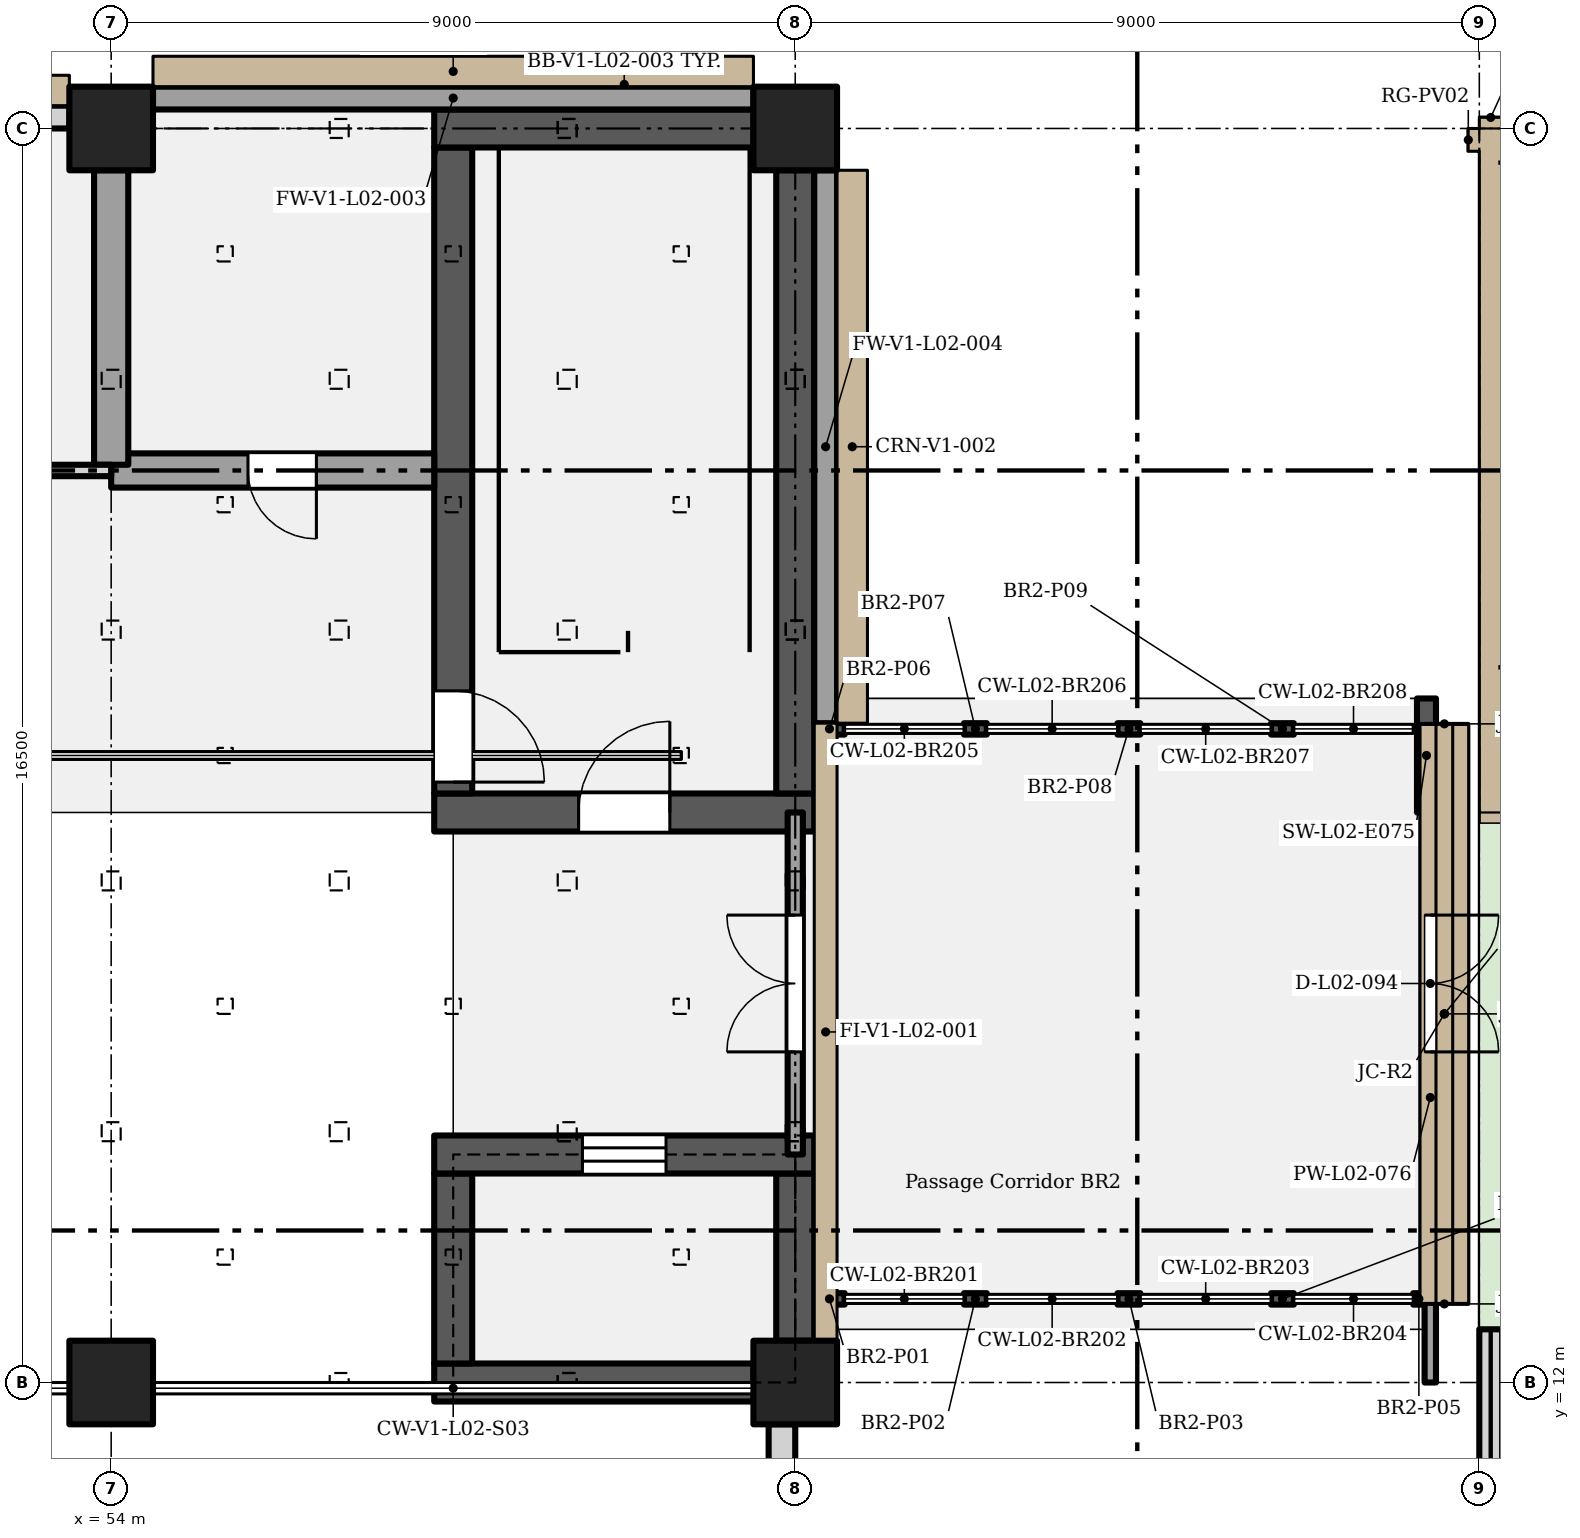
"""IFC4 building model, lengths in metres.
Left out: names, types, materials, properties, quantities, classifications, styles, units other than length and angle.
Written with IfcOpenShell. Run it as: python <this file> out.ifc"""

import sys

from ifc_helpers import new_model, si_unit, direction, frame, frame_2d, origin, origin_2d, place, context, subcontext, project, spatial, rectangle, extrude, element, fill, save


model = new_model("IFC4")
c1 = context("Model", 3, precision=1e-05, world=origin(), true_north=direction((0.0, 1.0)))
c2 = subcontext(c1, "Body", "Model", "MODEL_VIEW")
j1 = project(units=[si_unit("LENGTHUNIT", "METRE"), si_unit("PLANEANGLEUNIT", "RADIAN")], contexts=[c1])
p1 = place(None, origin())
s1 = spatial("IfcSite", under=j1, at=p1, CompositionType="ELEMENT")
p2 = place(p1, origin())
s2 = spatial("IfcBuilding", under=s1, at=p2, CompositionType="ELEMENT")
p3 = place(p2, frame((0.0, 0.0, 12.0)))
s3 = spatial("IfcBuildingStorey", under=s2, at=p3, CompositionType="ELEMENT", Elevation=12.0)
for number, where, z_axis, x_axis in (
    (1, (54.0, 12.0, 0.0), (0.0, 0.0, 1.0), (1.0, 0.0, 0.0)),
    (2, (63.0, 12.0, 0.0), (0.0, 0.0, 1.0), (1.0, 0.0, 0.0)),
    (3, (54.0, 28.5, 0.0), (0.0, 0.0, 1.0), (1.0, 0.0, 0.0)),
    (4, (63.0, 28.5, 0.0), (0.0, 0.0, 1.0), (1.0, 0.0, 0.0)),
):
    element("IfcColumn", number, at=place(p3, frame(where, z_axis=z_axis, x_axis=x_axis)), inside=s3, PredefinedType="COLUMN", context=c2, shape_type="SweptSolid", body=[
        extrude(rectangle(XDim=1.1, YDim=1.1, at=origin_2d()), origin(), (0.0, 0.0, 1.0), 5.4),
    ])
p4 = place(p3, frame((58.25, 12.0, 0.0), z_axis=(0.0, 0.0, 1.0), x_axis=(1.0, 0.0, 0.0)))
e5 = element("IfcWall", 5, at=p4, inside=s3, PredefinedType="SHEAR", context=c2, shape_type="SweptSolid", body=[
    extrude(rectangle(XDim=4.2, YDim=0.5, at=frame_2d((2.1, 0.0))), origin(), (0.0, 0.0, 1.0), 5.4),
])
p5 = place(p3, frame((58.5, 12.25, 0.0), z_axis=(0.0, 0.0, 1.0), x_axis=(0.0, 1.0, 0.0)))
e6 = element("IfcWall", 6, at=p5, inside=s3, PredefinedType="SHEAR", context=c2, shape_type="SweptSolid", body=[
    extrude(rectangle(XDim=2.5, YDim=0.5, at=frame_2d((1.25, 0.0))), origin(), (0.0, 0.0, 1.0), 5.4),
])
p6 = place(p3, frame((63.0, 12.55, 0.0), z_axis=(0.0, 0.0, 1.0), x_axis=(0.0, 1.0, 0.0)))
e7 = element("IfcWall", 7, at=p6, inside=s3, PredefinedType="SHEAR", context=c2, shape_type="SweptSolid", body=[
    extrude(rectangle(XDim=2.2, YDim=0.5, at=frame_2d((1.1, 0.0))), origin(), (0.0, 0.0, 1.0), 5.4),
])
p7 = place(p3, frame((58.25, 15.0, 0.0), z_axis=(0.0, 0.0, 1.0), x_axis=(1.0, 0.0, 0.0)))
e8 = element("IfcWall", 8, at=p7, inside=s3, PredefinedType="SHEAR", context=c2, shape_type="SweptSolid", body=[
    extrude(rectangle(XDim=5.0, YDim=0.5, at=frame_2d((2.5, 0.0))), origin(), (0.0, 0.0, 1.0), 5.4),
])
p8 = place(p7, frame((1.95, 0.0, 0.0)))
e9 = element("IfcOpeningElement", 9, at=p8, cuts=e8, PredefinedType="OPENING", context=c2, shape_type="SweptSolid", body=[
    extrude(rectangle(XDim=1.1, YDim=2.1, at=frame_2d((0.55, 1.05))), frame((0.0, 0.26, 0.0), z_axis=(0.0, -1.0, 0.0), x_axis=(1.0, 0.0, 0.0)), (0.0, 0.0, 1.0), 0.52),
])
p9 = place(p3, frame((58.25, 19.5, 0.0), z_axis=(0.0, 0.0, 1.0), x_axis=(1.0, 0.0, 0.0)))
e10 = element("IfcWall", 10, at=p9, inside=s3, PredefinedType="SHEAR", context=c2, shape_type="SweptSolid", body=[
    extrude(rectangle(XDim=5.0, YDim=0.5, at=frame_2d((2.5, 0.0))), origin(), (0.0, 0.0, 1.0), 5.4),
])
p10 = place(p9, frame((1.9, 0.0, 0.0)))
e11 = element("IfcOpeningElement", 11, at=p10, cuts=e10, PredefinedType="OPENING", context=c2, shape_type="SweptSolid", body=[
    extrude(rectangle(XDim=1.2, YDim=2.1, at=frame_2d((0.6, 1.05))), frame((0.0, 0.26, 0.0), z_axis=(0.0, -1.0, 0.0), x_axis=(1.0, 0.0, 0.0)), (0.0, 0.0, 1.0), 0.52),
])
p11 = place(p3, frame((58.5, 19.75, 0.0), z_axis=(0.0, 0.0, 1.0), x_axis=(0.0, 1.0, 0.0)))
e12 = element("IfcWall", 12, at=p11, inside=s3, PredefinedType="SHEAR", context=c2, shape_type="SweptSolid", body=[
    extrude(rectangle(XDim=8.5, YDim=0.5, at=frame_2d((4.25, 0.0))), origin(), (0.0, 0.0, 1.0), 5.4),
])
p12 = place(p11, frame((1.35, 0.0, 0.0), z_axis=(0.0, 0.0, 1.0), x_axis=(-1.0, 0.0, 0.0)))
e13 = element("IfcOpeningElement", 13, at=p12, cuts=e12, PredefinedType="OPENING", context=c2, shape_type="SweptSolid", body=[
    extrude(rectangle(XDim=1.2, YDim=2.1, at=frame_2d((0.6, 1.05))), frame((0.0, 0.26, 0.0), z_axis=(0.0, -1.0, 0.0), x_axis=(1.0, 0.0, 0.0)), (0.0, 0.0, 1.0), 0.52),
])
p13 = place(p3, frame((63.0, 19.75, 0.0), z_axis=(0.0, 0.0, 1.0), x_axis=(0.0, 1.0, 0.0)))
e14 = element("IfcWall", 14, at=p13, inside=s3, PredefinedType="SHEAR", context=c2, shape_type="SweptSolid", body=[
    extrude(rectangle(XDim=8.2, YDim=0.5, at=frame_2d((4.1, 0.0))), origin(), (0.0, 0.0, 1.0), 5.4),
])
p14 = place(p3, frame((58.25, 28.5, 0.0), z_axis=(0.0, 0.0, 1.0), x_axis=(1.0, 0.0, 0.0)))
e15 = element("IfcWall", 15, at=p14, inside=s3, PredefinedType="SHEAR", context=c2, shape_type="SweptSolid", body=[
    extrude(rectangle(XDim=4.2, YDim=0.5, at=frame_2d((2.1, 0.0))), origin(), (0.0, 0.0, 1.0), 5.4),
])
p15 = place(p3, frame((45.55, 28.65, 0.0), z_axis=(0.0, 0.0, 1.0), x_axis=(1.0, 0.0, 0.0)))
e16 = element("IfcWall", 16, at=p15, inside=s3, PredefinedType="SOLIDWALL", context=c2, shape_type="SweptSolid", body=[
    extrude(rectangle(XDim=7.9, YDim=0.3, at=frame_2d((3.95, 0.0))), origin(), (0.0, 0.0, 1.0), 5.4),
])
p16 = place(p15, frame((0.425, 0.0, 1.05)))
e17 = element("IfcOpeningElement", 17, at=p16, cuts=e16, PredefinedType="OPENING", context=c2, shape_type="SweptSolid", body=[
    extrude(rectangle(XDim=1.05, YDim=2.4, at=frame_2d((0.525, 1.2))), frame((0.0, 0.16, 0.0), z_axis=(0.0, -1.0, 0.0), x_axis=(1.0, 0.0, 0.0)), (0.0, 0.0, 1.0), 0.32),
])
p17 = place(p15, frame((3.425, 0.0, 1.05)))
e18 = element("IfcOpeningElement", 18, at=p17, cuts=e16, PredefinedType="OPENING", context=c2, shape_type="SweptSolid", body=[
    extrude(rectangle(XDim=1.05, YDim=2.4, at=frame_2d((0.525, 1.2))), frame((0.0, 0.16, 0.0), z_axis=(0.0, -1.0, 0.0), x_axis=(1.0, 0.0, 0.0)), (0.0, 0.0, 1.0), 0.32),
])
p18 = place(p15, frame((6.425, 0.0, 1.05)))
e19 = element("IfcOpeningElement", 19, at=p18, cuts=e16, PredefinedType="OPENING", context=c2, shape_type="SweptSolid", body=[
    extrude(rectangle(XDim=1.05, YDim=2.4, at=frame_2d((0.525, 1.2))), frame((0.0, 0.16, 0.0), z_axis=(0.0, -1.0, 0.0), x_axis=(1.0, 0.0, 0.0)), (0.0, 0.0, 1.0), 0.32),
])
p19 = place(p3, frame((54.55, 28.9, 0.0), z_axis=(0.0, 0.0, 1.0), x_axis=(1.0, 0.0, 0.0)))
e20 = element("IfcWall", 20, at=p19, inside=s3, PredefinedType="SOLIDWALL", context=c2, shape_type="SweptSolid", body=[
    extrude(rectangle(XDim=7.9, YDim=0.3, at=frame_2d((3.95, 0.0))), origin(), (0.0, 0.0, 1.0), 5.4),
])
p20 = place(p3, frame((63.4, 20.675, 0.0), z_axis=(0.0, 0.0, 1.0), x_axis=(0.0, 1.0, 0.0)))
e21 = element("IfcWall", 21, at=p20, inside=s3, PredefinedType="SOLIDWALL", context=c2, shape_type="SweptSolid", body=[
    extrude(rectangle(XDim=7.275, YDim=0.3, at=frame_2d((3.637, 0.0))), origin(), (0.0, 0.0, 1.0), 5.4),
])
p21 = place(p3, frame((62.825, 0.7, 0.0), z_axis=(0.0, 0.0, 1.0), x_axis=(0.0, 1.0, 0.0)))
e22 = element("IfcWall", 22, at=p21, inside=s3, PredefinedType="SOLIDWALL", context=c2, shape_type="SweptSolid", body=[
    extrude(rectangle(XDim=10.75, YDim=0.35, at=frame_2d((5.375, 0.0))), origin(), (0.0, 0.0, 1.0), 5.4),
])
p22 = place(p2, frame((0.0, 0.0, 6.6)))
s4 = spatial("IfcBuildingStorey", under=s2, at=p22, CompositionType="ELEMENT", Elevation=6.6)
p23 = place(p22, frame((71.43, 19.5, 5.202), z_axis=(0.0, 0.0, 1.0), x_axis=(1.0, 0.0, 0.0)))
e23 = element("IfcWall", 23, at=p23, inside=s4, PredefinedType="SOLIDWALL", context=c2, shape_type="SweptSolid", body=[
    extrude(rectangle(XDim=5.21, YDim=0.28, at=frame_2d((2.605, 0.0))), origin(), (0.0, 0.0, 1.0), 3.1),
])
p24 = place(p23, frame((2.055, 0.0, 2.4)))
e24 = element("IfcOpeningElement", 24, at=p24, cuts=e23, PredefinedType="OPENING", context=c2, shape_type="SweptSolid", body=[
    extrude(rectangle(XDim=1.1, YDim=0.6, at=frame_2d((0.55, 0.3))), frame((0.0, 0.15, 0.0), z_axis=(0.0, -1.0, 0.0), x_axis=(1.0, 0.0, 0.0)), (0.0, 0.0, 1.0), 0.3),
])
p25 = place(p22, frame((71.86, 28.5, 5.202), z_axis=(0.0, 0.0, 1.0), x_axis=(1.0, 0.0, 0.0)))
e25 = element("IfcWall", 25, at=p25, inside=s4, PredefinedType="SOLIDWALL", context=c2, shape_type="SweptSolid", body=[
    extrude(rectangle(XDim=4.5, YDim=0.28, at=frame_2d((2.25, 0.0))), origin(), (0.0, 0.0, 1.0), 3.1),
])
p26 = place(p22, frame((72.0, 19.64, 5.202), z_axis=(0.0, 0.0, 1.0), x_axis=(0.0, 1.0, 0.0)))
e26 = element("IfcWall", 26, at=p26, inside=s4, PredefinedType="SOLIDWALL", context=c2, shape_type="SweptSolid", body=[
    extrude(rectangle(XDim=8.72, YDim=0.28, at=frame_2d((4.36, 0.0))), origin(), (0.0, 0.0, 1.0), 3.1),
])
p27 = place(p3, frame((72.15, 0.3, -0.198), z_axis=(0.0, 0.0, 1.0), x_axis=(0.0, 1.0, 0.0)))
e27 = element("IfcWall", 27, at=p27, inside=s3, PredefinedType="PARAPET", context=c2, shape_type="SweptSolid", body=[
    extrude(rectangle(XDim=12.4, YDim=0.3, at=frame_2d((6.2, 0.0))), origin(), (0.0, 0.0, 1.0), 0.6),
])
p28 = place(p3, frame((40.75, 24.0, 0.0), z_axis=(0.0, 0.0, 1.0), x_axis=(1.0, 0.0, 0.0)))
e28 = element("IfcWall", 28, at=p28, inside=s3, PredefinedType="PARTITIONING", context=c2, shape_type="SweptSolid", body=[
    extrude(rectangle(XDim=13.25, YDim=0.15, at=frame_2d((6.625, 0.0))), origin(), (0.0, 0.0, 1.0), 5.4),
])
p29 = place(p28, frame((2.5, 0.0, 0.0), z_axis=(0.0, 0.0, 1.0), x_axis=(-1.0, 0.0, 0.0)))
e29 = element("IfcOpeningElement", 29, at=p29, cuts=e28, PredefinedType="OPENING", context=c2, shape_type="SweptSolid", body=[
    extrude(rectangle(XDim=1.0, YDim=2.4, at=frame_2d((0.5, 1.2))), frame((0.0, 0.085, 0.0), z_axis=(0.0, -1.0, 0.0), x_axis=(1.0, 0.0, 0.0)), (0.0, 0.0, 1.0), 0.17),
])
p30 = place(p28, frame((9.25, 0.0, 0.0), z_axis=(0.0, 0.0, 1.0), x_axis=(-1.0, 0.0, 0.0)))
e30 = element("IfcOpeningElement", 30, at=p30, cuts=e28, PredefinedType="OPENING", context=c2, shape_type="SweptSolid", body=[
    extrude(rectangle(XDim=1.0, YDim=2.4, at=frame_2d((0.5, 1.2))), frame((0.0, 0.085, 0.0), z_axis=(0.0, -1.0, 0.0), x_axis=(1.0, 0.0, 0.0)), (0.0, 0.0, 1.0), 0.17),
])
p31 = place(p3, frame((54.0, 24.0, 0.0), z_axis=(0.0, 0.0, 1.0), x_axis=(1.0, 0.0, 0.0)))
e31 = element("IfcWall", 31, at=p31, inside=s3, PredefinedType="PARTITIONING", context=c2, shape_type="SweptSolid", body=[
    extrude(rectangle(XDim=4.25, YDim=0.45, at=frame_2d((2.125, 0.0))), origin(), (0.0, 0.0, 1.0), 5.4),
])
p32 = place(p31, frame((2.7, 0.0, 0.0), z_axis=(0.0, 0.0, 1.0), x_axis=(-1.0, 0.0, 0.0)))
e32 = element("IfcOpeningElement", 32, at=p32, cuts=e31, PredefinedType="OPENING", context=c2, shape_type="SweptSolid", body=[
    extrude(rectangle(XDim=0.9, YDim=2.4, at=frame_2d((0.45, 1.2))), frame((0.0, 0.235, 0.0), z_axis=(0.0, -1.0, 0.0), x_axis=(1.0, 0.0, 0.0)), (0.0, 0.0, 1.0), 0.47),
])
p33 = place(p3, frame((54.0, 24.075, 0.0), z_axis=(0.0, 0.0, 1.0), x_axis=(0.0, 1.0, 0.0)))
e33 = element("IfcWall", 33, at=p33, inside=s3, PredefinedType="PARTITIONING", context=c2, shape_type="SweptSolid", body=[
    extrude(rectangle(XDim=3.875, YDim=0.45, at=frame_2d((1.938, 0.0))), origin(), (0.0, 0.0, 1.0), 5.4),
])
p34 = place(p3, frame((63.0, 15.0, 0.0), z_axis=(0.0, 0.0, 1.0), x_axis=(0.0, 1.0, 0.0)))
e34 = element("IfcWall", 34, at=p34, inside=s3, PredefinedType="PARTITIONING", context=c2, shape_type="SweptSolid", body=[
    extrude(rectangle(XDim=4.5, YDim=0.2, at=frame_2d((2.25, 0.0))), origin(), (0.0, 0.0, 1.0), 3.3),
])
p35 = place(p34, frame((1.35, 0.0, 0.0)))
e35 = element("IfcOpeningElement", 35, at=p35, cuts=e34, PredefinedType="OPENING", context=c2, shape_type="SweptSolid", body=[
    extrude(rectangle(XDim=1.8, YDim=2.4, at=frame_2d((0.9, 1.2))), frame((0.0, 0.11, 0.0), z_axis=(0.0, -1.0, 0.0), x_axis=(1.0, 0.0, 0.0)), (0.0, 0.0, 1.0), 0.22),
])
p36 = place(p3, frame((71.305, 19.5, 0.0), z_axis=(0.0, 0.0, 1.0), x_axis=(0.0, 1.0, 0.0)))
e36 = element("IfcWall", 36, at=p36, inside=s3, PredefinedType="SHEAR", context=c2, shape_type="SweptSolid", body=[
    extrude(rectangle(XDim=1.5, YDim=0.25, at=frame_2d((0.75, 0.0))), origin(), (0.0, 0.0, 1.0), 2.902),
])
p37 = place(p3, frame((71.355, 12.0, 0.0), z_axis=(0.0, 0.0, 1.0), x_axis=(0.0, 1.0, 0.0)))
e37 = element("IfcWall", 37, at=p37, inside=s3, PredefinedType="PARTITIONING", context=c2, shape_type="SweptSolid", body=[
    extrude(rectangle(XDim=7.5, YDim=0.15, at=frame_2d((3.75, 0.0))), origin(), (0.0, 0.0, 1.0), 2.902),
])
p38 = place(p37, frame((6.15, 0.0, 0.0), z_axis=(0.0, 0.0, 1.0), x_axis=(-1.0, 0.0, 0.0)))
e38 = element("IfcOpeningElement", 38, at=p38, cuts=e37, PredefinedType="OPENING", context=c2, shape_type="SweptSolid", body=[
    extrude(rectangle(XDim=1.8, YDim=2.4, at=frame_2d((0.9, 1.2))), frame((0.0, 0.085, 0.0), z_axis=(0.0, -1.0, 0.0), x_axis=(1.0, 0.0, 0.0)), (0.0, 0.0, 1.0), 0.17),
])
p39 = place(p3, frame((63.25, 13.1, 0.0), z_axis=(0.0, 0.0, 1.0), x_axis=(1.0, 0.0, 0.0)))
e39 = element("IfcWall", 39, at=p39, inside=s3, PredefinedType="SOLIDWALL", context=c2, shape_type="SweptSolid", body=[
    extrude(rectangle(XDim=0.4, YDim=0.15, at=frame_2d((0.2, 0.0))), origin(), (0.0, 0.0, 1.0), 3.3),
])
for number, where, z_axis, x_axis in (
    (40, (65.22, 13.1, 0.0), (0.0, 0.0, 1.0), (1.0, 0.0, 0.0)),
    (41, (67.24, 13.1, 0.0), (0.0, 0.0, 1.0), (1.0, 0.0, 0.0)),
    (42, (69.26, 13.1, 0.0), (0.0, 0.0, 1.0), (1.0, 0.0, 0.0)),
):
    element("IfcWall", number, at=place(p3, frame(where, z_axis=z_axis, x_axis=x_axis)), inside=s3, PredefinedType="SOLIDWALL", context=c2, shape_type="SweptSolid", body=[
        extrude(rectangle(XDim=0.3, YDim=0.15, at=frame_2d((0.15, 0.0))), origin(), (0.0, 0.0, 1.0), 3.3),
    ])
p40 = place(p3, frame((71.13, 13.1, 0.0), z_axis=(0.0, 0.0, 1.0), x_axis=(1.0, 0.0, 0.0)))
e43 = element("IfcWall", 43, at=p40, inside=s3, PredefinedType="SOLIDWALL", context=c2, shape_type="SweptSolid", body=[
    extrude(rectangle(XDim=0.15, YDim=0.15, at=frame_2d((0.075, 0.0))), origin(), (0.0, 0.0, 1.0), 3.3),
])
p41 = place(p3, frame((63.25, 20.6, 0.0), z_axis=(0.0, 0.0, 1.0), x_axis=(1.0, 0.0, 0.0)))
e44 = element("IfcWall", 44, at=p41, inside=s3, PredefinedType="SOLIDWALL", context=c2, shape_type="SweptSolid", body=[
    extrude(rectangle(XDim=0.4, YDim=0.15, at=frame_2d((0.2, 0.0))), origin(), (0.0, 0.0, 1.0), 3.3),
])
for number, where, z_axis, x_axis in (
    (45, (65.22, 20.6, 0.0), (0.0, 0.0, 1.0), (1.0, 0.0, 0.0)),
    (46, (67.24, 20.6, 0.0), (0.0, 0.0, 1.0), (1.0, 0.0, 0.0)),
    (47, (69.26, 20.6, 0.0), (0.0, 0.0, 1.0), (1.0, 0.0, 0.0)),
):
    element("IfcWall", number, at=place(p3, frame(where, z_axis=z_axis, x_axis=x_axis)), inside=s3, PredefinedType="SOLIDWALL", context=c2, shape_type="SweptSolid", body=[
        extrude(rectangle(XDim=0.3, YDim=0.15, at=frame_2d((0.15, 0.0))), origin(), (0.0, 0.0, 1.0), 3.3),
    ])
p42 = place(p35, origin())
e48 = element("IfcDoor", 48, at=p42, inside=s3, OperationType="DOUBLE_DOOR_SINGLE_SWING", PredefinedType="DOOR", context=c2, shape_type="SweptSolid", body=[
    extrude(rectangle(XDim=1.8, YDim=2.4, at=frame_2d((0.9, 1.2))), frame((0.0, 0.025, 0.0), z_axis=(0.0, -1.0, 0.0), x_axis=(1.0, 0.0, 0.0)), (0.0, 0.0, 1.0), 0.05),
])
fill(e35, e48)
p43 = place(p38, origin())
e49 = element("IfcDoor", 49, at=p43, inside=s3, OperationType="DOUBLE_DOOR_SINGLE_SWING", PredefinedType="DOOR", context=c2, shape_type="SweptSolid", body=[
    extrude(rectangle(XDim=1.8, YDim=2.4, at=frame_2d((0.9, 1.2))), frame((0.0, 0.025, 0.0), z_axis=(0.0, -1.0, 0.0), x_axis=(1.0, 0.0, 0.0)), (0.0, 0.0, 1.0), 0.05),
])
fill(e38, e49)
p44 = place(p12, origin())
e50 = element("IfcDoor", 50, at=p44, inside=s3, OperationType="SINGLE_SWING_RIGHT", PredefinedType="DOOR", context=c2, shape_type="SweptSolid", body=[
    extrude(rectangle(XDim=1.2, YDim=2.1, at=frame_2d((0.6, 1.05))), frame((0.0, 0.025, 0.0), z_axis=(0.0, -1.0, 0.0), x_axis=(1.0, 0.0, 0.0)), (0.0, 0.0, 1.0), 0.05),
])
fill(e13, e50)
p45 = place(p10, origin())
e51 = element("IfcDoor", 51, at=p45, inside=s3, OperationType="SINGLE_SWING_RIGHT", PredefinedType="DOOR", context=c2, shape_type="SweptSolid", body=[
    extrude(rectangle(XDim=1.2, YDim=2.1, at=frame_2d((0.6, 1.05))), frame((0.0, 0.025, 0.0), z_axis=(0.0, -1.0, 0.0), x_axis=(1.0, 0.0, 0.0)), (0.0, 0.0, 1.0), 0.05),
])
fill(e11, e51)
p46 = place(p32, origin())
e52 = element("IfcDoor", 52, at=p46, inside=s3, OperationType="SINGLE_SWING_LEFT", PredefinedType="DOOR", context=c2, shape_type="SweptSolid", body=[
    extrude(rectangle(XDim=0.9, YDim=2.4, at=frame_2d((0.45, 1.2))), frame((0.0, 0.025, 0.0), z_axis=(0.0, -1.0, 0.0), x_axis=(1.0, 0.0, 0.0)), (0.0, 0.0, 1.0), 0.05),
])
fill(e32, e52)
p47 = place(p8, origin())
e53 = element("IfcDoor", 53, at=p47, inside=s3, OperationType="SLIDING_TO_LEFT", PredefinedType="DOOR", context=c2, shape_type="SweptSolid", body=[
    extrude(rectangle(XDim=1.1, YDim=2.1, at=frame_2d((0.55, 1.05))), frame((0.0, 0.025, 0.0), z_axis=(0.0, -1.0, 0.0), x_axis=(1.0, 0.0, 0.0)), (0.0, 0.0, 1.0), 0.05),
])
fill(e9, e53)
save(model, sys.argv[1])
